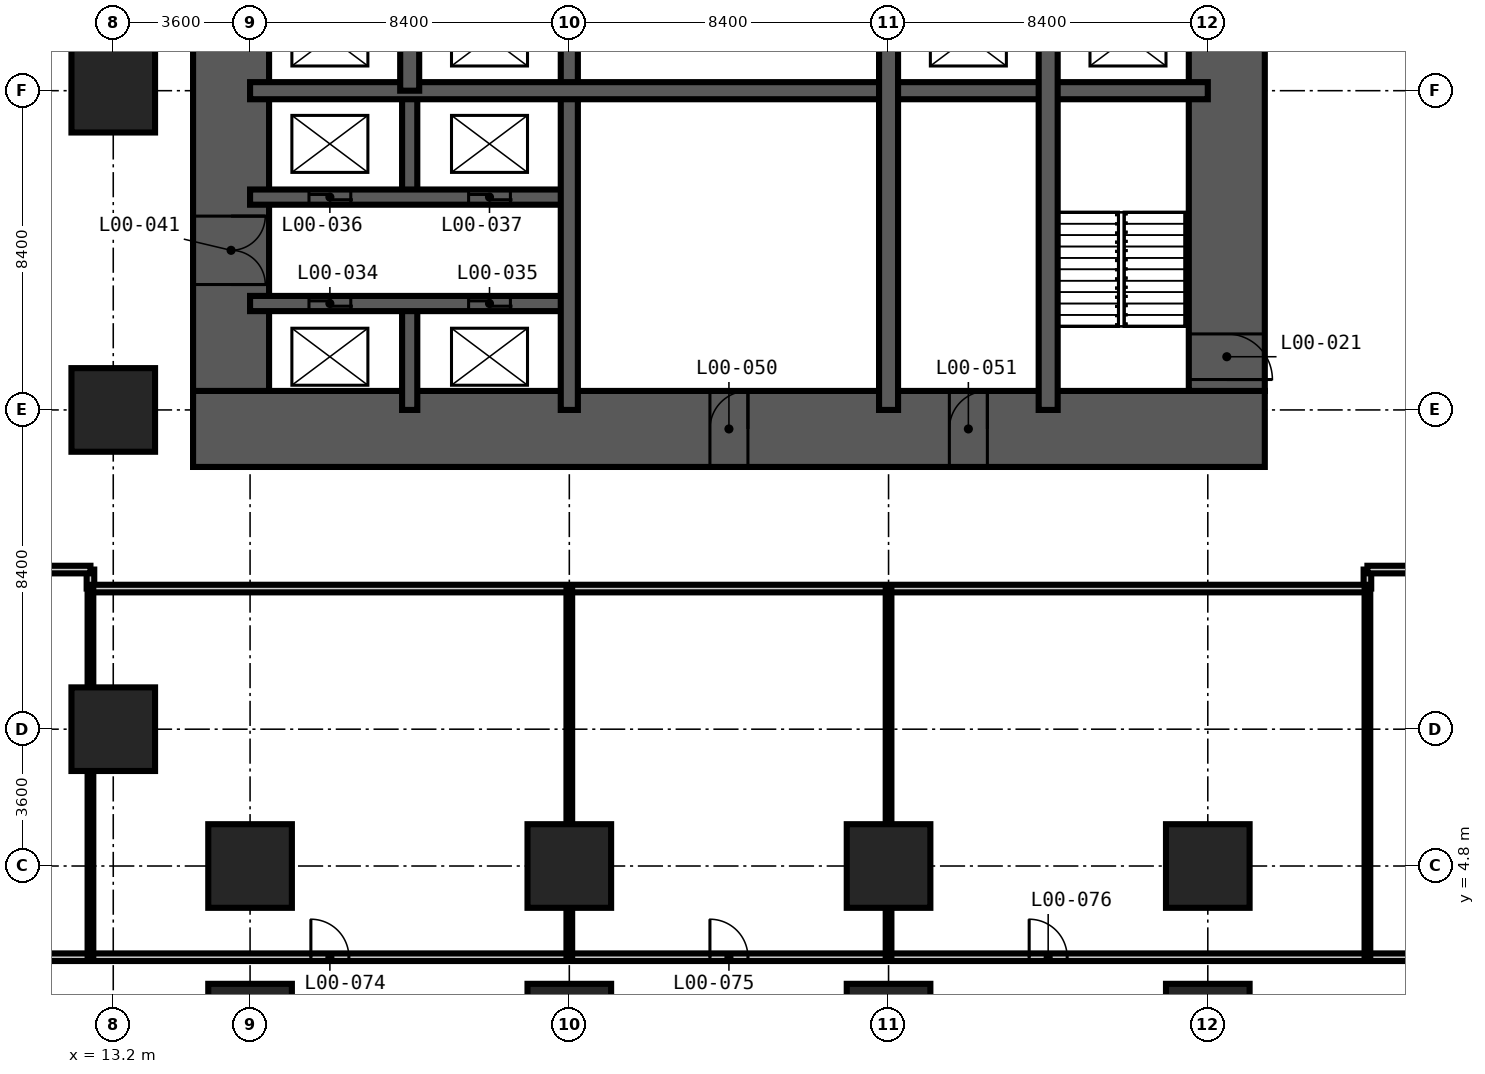
"""IFC4 building model, lengths in metres.
Left out: names, types, materials, properties, quantities, classifications, styles, units other than length and angle.
Written with IfcOpenShell. Run it as: python <this file> out.ifc"""

import sys

from ifc_helpers import new_model, si_unit, direction, frame, frame_2d, origin, origin_2d, place, context, subcontext, project, spatial, rectangle, extrude, element, fill, save


model = new_model("IFC4")
c1 = context("Model", 3, precision=1e-05, world=origin(), true_north=direction((0.0, 1.0)))
c2 = subcontext(c1, "Body", "Model", "MODEL_VIEW")
j1 = project(units=[si_unit("LENGTHUNIT", "METRE"), si_unit("PLANEANGLEUNIT", "RADIAN")], contexts=[c1])
p1 = place(None, origin())
s1 = spatial("IfcSite", under=j1, at=p1, CompositionType="ELEMENT")
p2 = place(p1, origin())
s2 = spatial("IfcBuilding", under=s1, at=p2, CompositionType="ELEMENT")
p3 = place(p2, origin())
s3 = spatial("IfcBuildingStorey", under=s2, at=p3, CompositionType="ELEMENT", Elevation=0.0)
for number, where, z_axis, x_axis in (
    (1, (13.2, 8.4, -0.3), (0.0, 0.0, 1.0), (1.0, 0.0, 0.0)),
    (2, (13.2, 16.8, -0.3), (0.0, 0.0, 1.0), (1.0, 0.0, 0.0)),
    (3, (13.2, 25.2, -0.3), (0.0, 0.0, 1.0), (1.0, 0.0, 0.0)),
    (4, (16.8, 0.6, -0.3), (0.0, 0.0, 1.0), (1.0, 0.0, 0.0)),
    (5, (16.8, 4.8, -0.3), (0.0, 0.0, 1.0), (1.0, 0.0, 0.0)),
    (6, (25.2, 0.6, -0.3), (0.0, 0.0, 1.0), (1.0, 0.0, 0.0)),
    (7, (25.2, 4.8, -0.3), (0.0, 0.0, 1.0), (1.0, 0.0, 0.0)),
    (8, (33.6, 0.6, -0.3), (0.0, 0.0, 1.0), (1.0, 0.0, 0.0)),
    (9, (33.6, 4.8, -0.3), (0.0, 0.0, 1.0), (1.0, 0.0, 0.0)),
    (10, (42.0, 0.6, -0.3), (0.0, 0.0, 1.0), (1.0, 0.0, 0.0)),
    (11, (42.0, 4.8, -0.3), (0.0, 0.0, 1.0), (1.0, 0.0, 0.0)),
):
    element("IfcColumn", number, at=place(p3, frame(where, z_axis=z_axis, x_axis=x_axis)), inside=s3, PredefinedType="COLUMN", context=c2, shape_type="SweptSolid", body=[
        extrude(rectangle(XDim=2.2, YDim=2.2, at=origin_2d()), origin(), (0.0, 0.0, 1.0), 6.0),
    ])
p4 = place(p3, frame((15.3, 16.3, -0.3), z_axis=(0.0, 0.0, 1.0), x_axis=(1.0, 0.0, 0.0)))
e12 = element("IfcWall", 12, at=p4, inside=s3, PredefinedType="SHEAR", context=c2, shape_type="SweptSolid", body=[
    extrude(rectangle(XDim=28.2, YDim=2.0, at=frame_2d((14.1, 0.0))), origin(), (0.0, 0.0, 1.0), 6.0),
])
p5 = place(p4, frame((13.6, 0.0, 0.3)))
e13 = element("IfcOpeningElement", 13, at=p5, cuts=e12, PredefinedType="OPENING", context=c2, shape_type="SweptSolid", body=[
    extrude(rectangle(XDim=1.0, YDim=2.1, at=frame_2d((0.5, 1.05))), frame((0.0, 1.01, 0.0), z_axis=(0.0, -1.0, 0.0), x_axis=(1.0, 0.0, 0.0)), (0.0, 0.0, 1.0), 2.02),
])
p6 = place(p4, frame((19.9, 0.0, 0.3)))
e14 = element("IfcOpeningElement", 14, at=p6, cuts=e12, PredefinedType="OPENING", context=c2, shape_type="SweptSolid", body=[
    extrude(rectangle(XDim=1.0, YDim=2.1, at=frame_2d((0.5, 1.05))), frame((0.0, 1.01, 0.0), z_axis=(0.0, -1.0, 0.0), x_axis=(1.0, 0.0, 0.0)), (0.0, 0.0, 1.0), 2.02),
])
p7 = place(p3, frame((42.5, 17.3, -0.3), z_axis=(0.0, 0.0, 1.0), x_axis=(0.0, 1.0, 0.0)))
e15 = element("IfcWall", 15, at=p7, inside=s3, PredefinedType="SHEAR", context=c2, shape_type="SweptSolid", body=[
    extrude(rectangle(XDim=24.2, YDim=2.0, at=frame_2d((12.1, 0.0))), origin(), (0.0, 0.0, 1.0), 6.0),
])
p8 = place(p7, frame((0.3, 0.0, 0.3)))
e16 = element("IfcOpeningElement", 16, at=p8, cuts=e15, PredefinedType="OPENING", context=c2, shape_type="SweptSolid", body=[
    extrude(rectangle(XDim=1.2, YDim=2.2, at=frame_2d((0.6, 1.1))), frame((0.0, 1.01, 0.0), z_axis=(0.0, -1.0, 0.0), x_axis=(1.0, 0.0, 0.0)), (0.0, 0.0, 1.0), 2.02),
])
p9 = place(p7, frame((11.2, 0.0, 0.3)))
e17 = element("IfcOpeningElement", 17, at=p9, cuts=e15, PredefinedType="OPENING", context=c2, shape_type="SweptSolid", body=[
    extrude(rectangle(XDim=1.8, YDim=2.2, at=frame_2d((0.9, 1.1))), frame((0.0, 1.01, 0.0), z_axis=(0.0, -1.0, 0.0), x_axis=(1.0, 0.0, 0.0)), (0.0, 0.0, 1.0), 2.02),
])
p10 = place(p7, frame((20.0, 0.0, 0.3)))
e18 = element("IfcOpeningElement", 18, at=p10, cuts=e15, PredefinedType="OPENING", context=c2, shape_type="SweptSolid", body=[
    extrude(rectangle(XDim=1.0, YDim=2.1, at=frame_2d((0.5, 1.05))), frame((0.0, 1.01, 0.0), z_axis=(0.0, -1.0, 0.0), x_axis=(1.0, 0.0, 0.0)), (0.0, 0.0, 1.0), 2.02),
])
p11 = place(p3, frame((16.3, 41.5, -0.3), z_axis=(0.0, 0.0, 1.0), x_axis=(0.0, -1.0, 0.0)))
e19 = element("IfcWall", 19, at=p11, inside=s3, PredefinedType="SHEAR", context=c2, shape_type="SweptSolid", body=[
    extrude(rectangle(XDim=24.2, YDim=2.0, at=frame_2d((12.1, 0.0))), origin(), (0.0, 0.0, 1.0), 6.0),
])
p12 = place(p11, frame((11.2, 0.0, 0.3)))
e20 = element("IfcOpeningElement", 20, at=p12, cuts=e19, PredefinedType="OPENING", context=c2, shape_type="SweptSolid", body=[
    extrude(rectangle(XDim=1.8, YDim=2.2, at=frame_2d((0.9, 1.1))), frame((0.0, 1.01, 0.0), z_axis=(0.0, -1.0, 0.0), x_axis=(1.0, 0.0, 0.0)), (0.0, 0.0, 1.0), 2.02),
])
p13 = place(p11, frame((19.6, 0.0, 0.3)))
e21 = element("IfcOpeningElement", 21, at=p13, cuts=e19, PredefinedType="OPENING", context=c2, shape_type="SweptSolid", body=[
    extrude(rectangle(XDim=1.8, YDim=2.2, at=frame_2d((0.9, 1.1))), frame((0.0, 1.01, 0.0), z_axis=(0.0, -1.0, 0.0), x_axis=(1.0, 0.0, 0.0)), (0.0, 0.0, 1.0), 2.02),
])
p14 = place(p11, frame((5.3, 0.0, 0.3)))
e22 = element("IfcOpeningElement", 22, at=p14, cuts=e19, PredefinedType="OPENING", context=c2, shape_type="SweptSolid", body=[
    extrude(rectangle(XDim=1.0, YDim=2.1, at=frame_2d((0.5, 1.05))), frame((0.0, 1.01, 0.0), z_axis=(0.0, -1.0, 0.0), x_axis=(1.0, 0.0, 0.0)), (0.0, 0.0, 1.0), 2.02),
])
for number, where, z_axis, x_axis in (
    (23, (21.0, 16.8, -0.3), (0.0, 0.0, 1.0), (0.0, 1.0, 0.0)),
    (24, (21.0, 22.4, -0.3), (0.0, 0.0, 1.0), (0.0, 1.0, 0.0)),
):
    element("IfcWall", number, at=place(p3, frame(where, z_axis=z_axis, x_axis=x_axis)), inside=s3, PredefinedType="SHEAR", context=c2, shape_type="SweptSolid", body=[
        extrude(rectangle(XDim=2.8, YDim=0.4, at=frame_2d((1.4, 0.0))), origin(), (0.0, 0.0, 1.0), 6.0),
    ])
p15 = place(p3, frame((16.8, 19.6, -0.3), z_axis=(0.0, 0.0, 1.0), x_axis=(1.0, 0.0, 0.0)))
e25 = element("IfcWall", 25, at=p15, inside=s3, PredefinedType="SHEAR", context=c2, shape_type="SweptSolid", body=[
    extrude(rectangle(XDim=8.4, YDim=0.4, at=frame_2d((4.2, 0.0))), origin(), (0.0, 0.0, 1.0), 6.0),
])
p16 = place(p15, frame((1.55, 0.0, 0.3)))
e26 = element("IfcOpeningElement", 26, at=p16, cuts=e25, PredefinedType="OPENING", context=c2, shape_type="SweptSolid", body=[
    extrude(rectangle(XDim=1.1, YDim=2.2, at=frame_2d((0.55, 1.1))), frame((0.0, 0.21, 0.0), z_axis=(0.0, -1.0, 0.0), x_axis=(1.0, 0.0, 0.0)), (0.0, 0.0, 1.0), 0.42),
])
p17 = place(p15, frame((5.75, 0.0, 0.3)))
e27 = element("IfcOpeningElement", 27, at=p17, cuts=e25, PredefinedType="OPENING", context=c2, shape_type="SweptSolid", body=[
    extrude(rectangle(XDim=1.1, YDim=2.2, at=frame_2d((0.55, 1.1))), frame((0.0, 0.21, 0.0), z_axis=(0.0, -1.0, 0.0), x_axis=(1.0, 0.0, 0.0)), (0.0, 0.0, 1.0), 0.42),
])
p18 = place(p3, frame((16.8, 22.4, -0.3), z_axis=(0.0, 0.0, 1.0), x_axis=(1.0, 0.0, 0.0)))
e28 = element("IfcWall", 28, at=p18, inside=s3, PredefinedType="SHEAR", context=c2, shape_type="SweptSolid", body=[
    extrude(rectangle(XDim=8.4, YDim=0.4, at=frame_2d((4.2, 0.0))), origin(), (0.0, 0.0, 1.0), 6.0),
])
p19 = place(p18, frame((1.55, 0.0, 0.3)))
e29 = element("IfcOpeningElement", 29, at=p19, cuts=e28, PredefinedType="OPENING", context=c2, shape_type="SweptSolid", body=[
    extrude(rectangle(XDim=1.1, YDim=2.2, at=frame_2d((0.55, 1.1))), frame((0.0, 0.21, 0.0), z_axis=(0.0, -1.0, 0.0), x_axis=(1.0, 0.0, 0.0)), (0.0, 0.0, 1.0), 0.42),
])
p20 = place(p18, frame((5.75, 0.0, 0.3)))
e30 = element("IfcOpeningElement", 30, at=p20, cuts=e28, PredefinedType="OPENING", context=c2, shape_type="SweptSolid", body=[
    extrude(rectangle(XDim=1.1, YDim=2.2, at=frame_2d((0.55, 1.1))), frame((0.0, 0.21, 0.0), z_axis=(0.0, -1.0, 0.0), x_axis=(1.0, 0.0, 0.0)), (0.0, 0.0, 1.0), 0.42),
])
for number, where, z_axis, x_axis in (
    (31, (25.2, 16.8, -0.3), (0.0, 0.0, 1.0), (0.0, 1.0, 0.0)),
    (32, (16.8, 25.2, -0.3), (0.0, 0.0, 1.0), (1.0, 0.0, 0.0)),
):
    element("IfcWall", number, at=place(p3, frame(where, z_axis=z_axis, x_axis=x_axis)), inside=s3, PredefinedType="SHEAR", context=c2, shape_type="SweptSolid", body=[
        extrude(rectangle(XDim=25.2, YDim=0.45, at=frame_2d((12.6, 0.0))), origin(), (0.0, 0.0, 1.0), 6.0),
    ])
p21 = place(p3, frame((21.0, 25.2, -0.3), z_axis=(0.0, 0.0, 1.0), x_axis=(0.0, 1.0, 0.0)))
e33 = element("IfcWall", 33, at=p21, inside=s3, PredefinedType="SHEAR", context=c2, shape_type="SweptSolid", body=[
    extrude(rectangle(XDim=2.8, YDim=0.5, at=frame_2d((1.4, 0.0))), origin(), (0.0, 0.0, 1.0), 6.0),
])
p22 = place(p3, frame((33.6, 16.8, -0.3), z_axis=(0.0, 0.0, 1.0), x_axis=(0.0, 1.0, 0.0)))
e34 = element("IfcWall", 34, at=p22, inside=s3, PredefinedType="SHEAR", context=c2, shape_type="SweptSolid", body=[
    extrude(rectangle(XDim=25.2, YDim=0.5, at=frame_2d((12.6, 0.0))), origin(), (0.0, 0.0, 1.0), 6.0),
])
p23 = place(p22, frame((22.5, 0.0, 0.3)))
e35 = element("IfcOpeningElement", 35, at=p23, cuts=e34, PredefinedType="OPENING", context=c2, shape_type="SweptSolid", body=[
    extrude(rectangle(XDim=1.2, YDim=2.2, at=frame_2d((0.6, 1.1))), frame((0.0, 0.26, 0.0), z_axis=(0.0, -1.0, 0.0), x_axis=(1.0, 0.0, 0.0)), (0.0, 0.0, 1.0), 0.52),
])
p24 = place(p22, frame((18.3, 0.0, 0.3)))
e36 = element("IfcOpeningElement", 36, at=p24, cuts=e34, PredefinedType="OPENING", context=c2, shape_type="SweptSolid", body=[
    extrude(rectangle(XDim=1.2, YDim=2.2, at=frame_2d((0.6, 1.1))), frame((0.0, 0.26, 0.0), z_axis=(0.0, -1.0, 0.0), x_axis=(1.0, 0.0, 0.0)), (0.0, 0.0, 1.0), 0.52),
])
p25 = place(p3, frame((37.8, 16.8, -0.3), z_axis=(0.0, 0.0, 1.0), x_axis=(0.0, 1.0, 0.0)))
e37 = element("IfcWall", 37, at=p25, inside=s3, PredefinedType="SHEAR", context=c2, shape_type="SweptSolid", body=[
    extrude(rectangle(XDim=11.2, YDim=0.5, at=frame_2d((5.6, 0.0))), origin(), (0.0, 0.0, 1.0), 6.0),
])
for number, where, z_axis, x_axis in (
    (38, (12.6, 12.1, 0.0), (0.0, 0.0, 1.0), (0.0, 1.0, 0.0)),
    (39, (46.2, 12.1, 0.0), (0.0, 0.0, 1.0), (0.0, 1.0, 0.0)),
):
    element("IfcWall", number, at=place(p3, frame(where, z_axis=z_axis, x_axis=x_axis)), inside=s3, PredefinedType="PARTITIONING", context=c2, shape_type="SweptSolid", body=[
        extrude(rectangle(XDim=0.5, YDim=0.2, at=frame_2d((0.25, 0.0))), origin(), (0.0, 0.0, 1.0), 5.7),
    ])
p26 = place(p3, frame((0.0, 2.4, 0.0), z_axis=(0.0, 0.0, 1.0), x_axis=(1.0, 0.0, 0.0)))
e40 = element("IfcWall", 40, at=p26, inside=s3, PredefinedType="PARTITIONING", context=c2, shape_type="SweptSolid", body=[
    extrude(rectangle(XDim=54.6, YDim=0.2, at=frame_2d((27.3, 0.0))), origin(), (0.0, 0.0, 1.0), 5.7),
])
p27 = place(p26, frame((5.8, 0.0, 0.0)))
e41 = element("IfcOpeningElement", 41, at=p27, cuts=e40, PredefinedType="OPENING", context=c2, shape_type="SweptSolid", body=[
    extrude(rectangle(XDim=1.0, YDim=2.1, at=frame_2d((0.5, 1.05))), frame((0.0, 0.11, 0.0), z_axis=(0.0, -1.0, 0.0), x_axis=(1.0, 0.0, 0.0)), (0.0, 0.0, 1.0), 0.22),
])
p28 = place(p26, frame((18.4, 0.0, 0.0)))
e42 = element("IfcOpeningElement", 42, at=p28, cuts=e40, PredefinedType="OPENING", context=c2, shape_type="SweptSolid", body=[
    extrude(rectangle(XDim=1.0, YDim=2.1, at=frame_2d((0.5, 1.05))), frame((0.0, 0.11, 0.0), z_axis=(0.0, -1.0, 0.0), x_axis=(1.0, 0.0, 0.0)), (0.0, 0.0, 1.0), 0.22),
])
p29 = place(p26, frame((28.9, 0.0, 0.0)))
e43 = element("IfcOpeningElement", 43, at=p29, cuts=e40, PredefinedType="OPENING", context=c2, shape_type="SweptSolid", body=[
    extrude(rectangle(XDim=1.0, YDim=2.1, at=frame_2d((0.5, 1.05))), frame((0.0, 0.11, 0.0), z_axis=(0.0, -1.0, 0.0), x_axis=(1.0, 0.0, 0.0)), (0.0, 0.0, 1.0), 0.22),
])
p30 = place(p26, frame((37.3, 0.0, 0.0)))
e44 = element("IfcOpeningElement", 44, at=p30, cuts=e40, PredefinedType="OPENING", context=c2, shape_type="SweptSolid", body=[
    extrude(rectangle(XDim=1.0, YDim=2.1, at=frame_2d((0.5, 1.05))), frame((0.0, 0.11, 0.0), z_axis=(0.0, -1.0, 0.0), x_axis=(1.0, 0.0, 0.0)), (0.0, 0.0, 1.0), 0.22),
])
p31 = place(p3, frame((12.6, 12.1, 0.0), z_axis=(0.0, 0.0, 1.0), x_axis=(1.0, 0.0, 0.0)))
e45 = element("IfcWall", 45, at=p31, inside=s3, PredefinedType="PARTITIONING", context=c2, shape_type="SweptSolid", body=[
    extrude(rectangle(XDim=33.6, YDim=0.2, at=frame_2d((16.8, 0.0))), origin(), (0.0, 0.0, 1.0), 5.7),
])
p32 = place(p3, frame((7.9, 12.6, 0.0), z_axis=(0.0, 0.0, 1.0), x_axis=(1.0, 0.0, 0.0)))
e46 = element("IfcWall", 46, at=p32, inside=s3, PredefinedType="PARTITIONING", context=c2, shape_type="SweptSolid", body=[
    extrude(rectangle(XDim=4.7, YDim=0.2, at=frame_2d((2.35, 0.0))), origin(), (0.0, 0.0, 1.0), 5.7),
])
p33 = place(p3, frame((46.2, 12.6, 0.0), z_axis=(0.0, 0.0, 1.0), x_axis=(1.0, 0.0, 0.0)))
e47 = element("IfcWall", 47, at=p33, inside=s3, PredefinedType="PARTITIONING", context=c2, shape_type="SweptSolid", body=[
    extrude(rectangle(XDim=8.4, YDim=0.2, at=frame_2d((4.2, 0.0))), origin(), (0.0, 0.0, 1.0), 5.7),
])
p34 = place(p33, frame((1.6, 0.0, 0.0)))
e48 = element("IfcOpeningElement", 48, at=p34, cuts=e47, PredefinedType="OPENING", context=c2, shape_type="SweptSolid", body=[
    extrude(rectangle(XDim=1.0, YDim=2.1, at=frame_2d((0.5, 1.05))), frame((0.0, 0.11, 0.0), z_axis=(0.0, -1.0, 0.0), x_axis=(1.0, 0.0, 0.0)), (0.0, 0.0, 1.0), 0.22),
])
for number, where, z_axis, x_axis in (
    (49, (12.6, 2.4, 0.0), (0.0, 0.0, 1.0), (0.0, 1.0, 0.0)),
    (50, (25.2, 2.4, 0.0), (0.0, 0.0, 1.0), (0.0, 1.0, 0.0)),
    (51, (33.6, 2.4, 0.0), (0.0, 0.0, 1.0), (0.0, 1.0, 0.0)),
    (52, (46.2, 2.4, 0.0), (0.0, 0.0, 1.0), (0.0, 1.0, 0.0)),
):
    element("IfcWall", number, at=place(p3, frame(where, z_axis=z_axis, x_axis=x_axis)), inside=s3, PredefinedType="PARTITIONING", context=c2, shape_type="SweptSolid", body=[
        extrude(rectangle(XDim=9.7, YDim=0.15, at=frame_2d((4.85, 0.0))), origin(), (0.0, 0.0, 1.0), 5.7),
    ])
p35 = place(p8, frame((1.2, 0.0, 0.0), z_axis=(0.0, 0.0, 1.0), x_axis=(-1.0, 0.0, 0.0)))
e53 = element("IfcDoor", 53, at=p35, inside=s3, OperationType="SINGLE_SWING_RIGHT", PredefinedType="DOOR", context=c2, shape_type="SweptSolid", body=[
    extrude(rectangle(XDim=1.2, YDim=2.2, at=frame_2d((0.6, 1.1))), frame((0.0, 0.025, 0.0), z_axis=(0.0, -1.0, 0.0), x_axis=(1.0, 0.0, 0.0)), (0.0, 0.0, 1.0), 0.05),
])
fill(e16, e53)
p36 = place(p16, origin())
e54 = element("IfcDoor", 54, at=p36, inside=s3, OperationType="DOUBLE_DOOR_SLIDING", PredefinedType="DOOR", context=c2, shape_type="SweptSolid", body=[
    extrude(rectangle(XDim=1.1, YDim=2.2, at=frame_2d((0.55, 1.1))), frame((0.0, 0.025, 0.0), z_axis=(0.0, -1.0, 0.0), x_axis=(1.0, 0.0, 0.0)), (0.0, 0.0, 1.0), 0.05),
])
fill(e26, e54)
p37 = place(p17, origin())
e55 = element("IfcDoor", 55, at=p37, inside=s3, OperationType="DOUBLE_DOOR_SLIDING", PredefinedType="DOOR", context=c2, shape_type="SweptSolid", body=[
    extrude(rectangle(XDim=1.1, YDim=2.2, at=frame_2d((0.55, 1.1))), frame((0.0, 0.025, 0.0), z_axis=(0.0, -1.0, 0.0), x_axis=(1.0, 0.0, 0.0)), (0.0, 0.0, 1.0), 0.05),
])
fill(e27, e55)
p38 = place(p19, origin())
e56 = element("IfcDoor", 56, at=p38, inside=s3, OperationType="DOUBLE_DOOR_SLIDING", PredefinedType="DOOR", context=c2, shape_type="SweptSolid", body=[
    extrude(rectangle(XDim=1.1, YDim=2.2, at=frame_2d((0.55, 1.1))), frame((0.0, 0.025, 0.0), z_axis=(0.0, -1.0, 0.0), x_axis=(1.0, 0.0, 0.0)), (0.0, 0.0, 1.0), 0.05),
])
fill(e29, e56)
p39 = place(p20, origin())
e57 = element("IfcDoor", 57, at=p39, inside=s3, OperationType="DOUBLE_DOOR_SLIDING", PredefinedType="DOOR", context=c2, shape_type="SweptSolid", body=[
    extrude(rectangle(XDim=1.1, YDim=2.2, at=frame_2d((0.55, 1.1))), frame((0.0, 0.025, 0.0), z_axis=(0.0, -1.0, 0.0), x_axis=(1.0, 0.0, 0.0)), (0.0, 0.0, 1.0), 0.05),
])
fill(e30, e57)
p40 = place(p13, origin())
e58 = element("IfcDoor", 58, at=p40, inside=s3, OperationType="DOUBLE_DOOR_DOUBLE_SWING", PredefinedType="DOOR", context=c2, shape_type="SweptSolid", body=[
    extrude(rectangle(XDim=1.8, YDim=2.2, at=frame_2d((0.9, 1.1))), frame((0.0, 0.025, 0.0), z_axis=(0.0, -1.0, 0.0), x_axis=(1.0, 0.0, 0.0)), (0.0, 0.0, 1.0), 0.05),
])
fill(e21, e58)
p41 = place(p5, origin())
e59 = element("IfcDoor", 59, at=p41, inside=s3, OperationType="SINGLE_SWING_RIGHT", PredefinedType="DOOR", context=c2, shape_type="SweptSolid", body=[
    extrude(rectangle(XDim=1.0, YDim=2.1, at=frame_2d((0.5, 1.05))), frame((0.0, 0.025, 0.0), z_axis=(0.0, -1.0, 0.0), x_axis=(1.0, 0.0, 0.0)), (0.0, 0.0, 1.0), 0.05),
])
fill(e13, e59)
p42 = place(p6, origin())
e60 = element("IfcDoor", 60, at=p42, inside=s3, OperationType="SINGLE_SWING_RIGHT", PredefinedType="DOOR", context=c2, shape_type="SweptSolid", body=[
    extrude(rectangle(XDim=1.0, YDim=2.1, at=frame_2d((0.5, 1.05))), frame((0.0, 0.025, 0.0), z_axis=(0.0, -1.0, 0.0), x_axis=(1.0, 0.0, 0.0)), (0.0, 0.0, 1.0), 0.05),
])
fill(e14, e60)
p43 = place(p28, origin())
e61 = element("IfcDoor", 61, at=p43, inside=s3, OperationType="SINGLE_SWING_LEFT", PredefinedType="DOOR", context=c2, shape_type="SweptSolid", body=[
    extrude(rectangle(XDim=1.0, YDim=2.1, at=frame_2d((0.5, 1.05))), frame((0.0, 0.025, 0.0), z_axis=(0.0, -1.0, 0.0), x_axis=(1.0, 0.0, 0.0)), (0.0, 0.0, 1.0), 0.05),
])
fill(e42, e61)
p44 = place(p29, origin())
e62 = element("IfcDoor", 62, at=p44, inside=s3, OperationType="SINGLE_SWING_LEFT", PredefinedType="DOOR", context=c2, shape_type="SweptSolid", body=[
    extrude(rectangle(XDim=1.0, YDim=2.1, at=frame_2d((0.5, 1.05))), frame((0.0, 0.025, 0.0), z_axis=(0.0, -1.0, 0.0), x_axis=(1.0, 0.0, 0.0)), (0.0, 0.0, 1.0), 0.05),
])
fill(e43, e62)
p45 = place(p30, origin())
e63 = element("IfcDoor", 63, at=p45, inside=s3, OperationType="SINGLE_SWING_LEFT", PredefinedType="DOOR", context=c2, shape_type="SweptSolid", body=[
    extrude(rectangle(XDim=1.0, YDim=2.1, at=frame_2d((0.5, 1.05))), frame((0.0, 0.025, 0.0), z_axis=(0.0, -1.0, 0.0), x_axis=(1.0, 0.0, 0.0)), (0.0, 0.0, 1.0), 0.05),
])
fill(e44, e63)
save(model, sys.argv[1])
